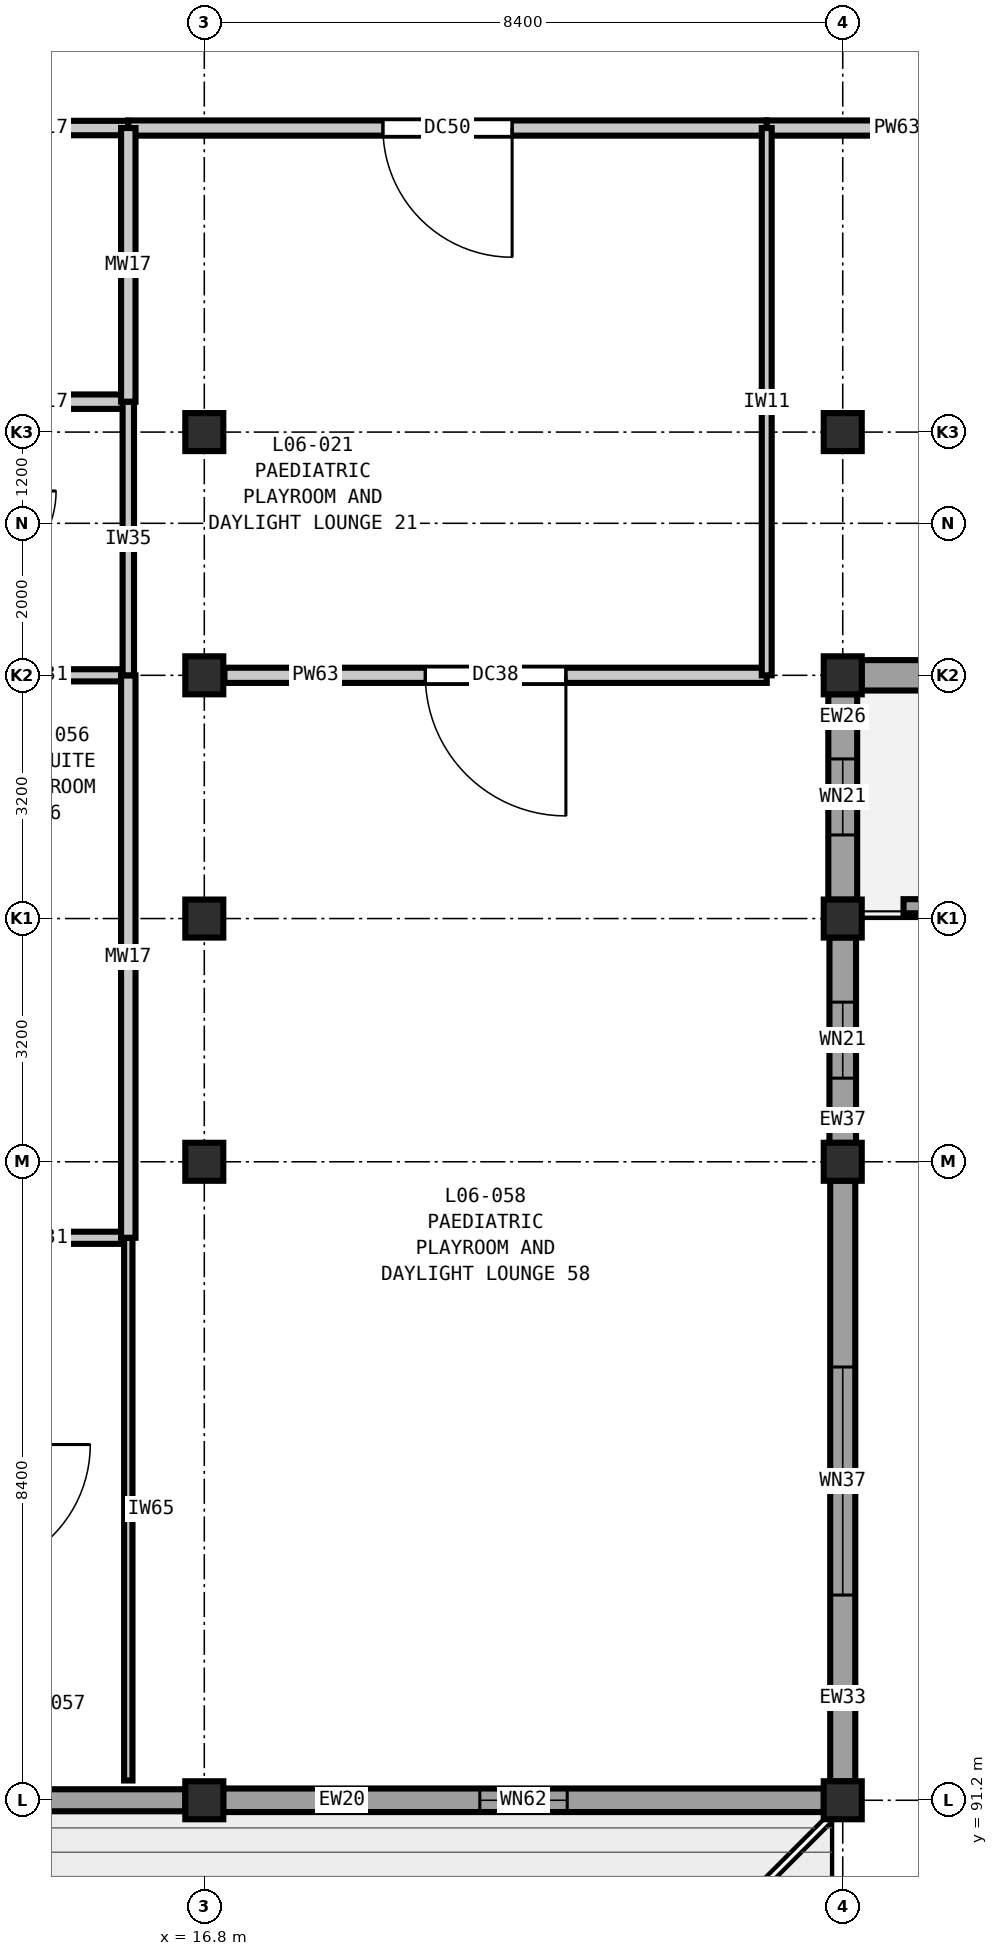
"""IFC4 building model, lengths in metres.
Left out: names, types, materials, properties, quantities, classifications, styles, units other than length and angle.
Written with IfcOpenShell. Run it as: python <this file> out.ifc"""

import sys

from ifc_helpers import new_model, si_unit, direction, frame, frame_2d, origin, origin_2d, place, context, subcontext, project, spatial, rectangle, extrude, element, fill, save


model = new_model("IFC4")
c1 = context("Model", 3, precision=1e-05, world=origin(), true_north=direction((0.0, 1.0)))
c2 = subcontext(c1, "Body", "Model", "MODEL_VIEW")
j1 = project(units=[si_unit("LENGTHUNIT", "METRE"), si_unit("PLANEANGLEUNIT", "RADIAN")], contexts=[c1])
p1 = place(None, origin())
s1 = spatial("IfcSite", under=j1, at=p1, CompositionType="ELEMENT")
p2 = place(p1, origin())
s2 = spatial("IfcBuilding", under=s1, at=p2, CompositionType="ELEMENT")
p3 = place(p2, frame((0.0, 0.0, 28.8)))
s3 = spatial("IfcBuildingStorey", under=s2, at=p3, CompositionType="ELEMENT", Elevation=28.8)
for number, where, z_axis, x_axis in (
    (1, (16.8, 91.2, 0.0), (0.0, 0.0, 1.0), (1.0, 0.0, 0.0)),
    (2, (16.8, 99.6, 0.0), (0.0, 0.0, 1.0), (1.0, 0.0, 0.0)),
    (3, (16.8, 102.8, 0.0), (0.0, 0.0, 1.0), (1.0, 0.0, 0.0)),
    (4, (16.8, 106.0, 0.0), (0.0, 0.0, 1.0), (1.0, 0.0, 0.0)),
    (5, (16.8, 109.2, 0.0), (0.0, 0.0, 1.0), (1.0, 0.0, 0.0)),
    (6, (25.2, 91.2, 0.0), (0.0, 0.0, 1.0), (1.0, 0.0, 0.0)),
    (7, (25.2, 99.6, 0.0), (0.0, 0.0, 1.0), (1.0, 0.0, 0.0)),
    (8, (25.2, 102.8, 0.0), (0.0, 0.0, 1.0), (1.0, 0.0, 0.0)),
    (9, (25.2, 106.0, 0.0), (0.0, 0.0, 1.0), (1.0, 0.0, 0.0)),
    (10, (25.2, 109.2, 0.0), (0.0, 0.0, 1.0), (1.0, 0.0, 0.0)),
):
    element("IfcColumn", number, at=place(p3, frame(where, z_axis=z_axis, x_axis=x_axis)), inside=s3, PredefinedType="COLUMN", context=c2, shape_type="SweptSolid", body=[
        extrude(rectangle(XDim=0.5, YDim=0.5, at=origin_2d()), origin(), (0.0, 0.0, 1.0), 4.2),
    ])
p4 = place(p3, frame((33.352, 106.0, 0.0), z_axis=(0.0, 0.0, 1.0), x_axis=(-1.0, 0.0, 0.0)))
e11 = element("IfcWall", 11, at=p4, inside=s3, PredefinedType="SOLIDWALL", context=c2, shape_type="SweptSolid", body=[
    extrude(rectangle(XDim=7.904, YDim=0.4, at=frame_2d((3.952, 0.0))), origin(), (0.0, 0.0, 1.0), 3.48),
])
p5 = place(p4, frame((2.877, 0.0, 0.9)))
e12 = element("IfcOpeningElement", 12, at=p5, cuts=e11, PredefinedType="OPENING", context=c2, shape_type="SweptSolid", body=[
    extrude(rectangle(XDim=2.15, YDim=2.15, at=frame_2d((1.075, 1.075))), frame((0.0, 0.21, 0.0), z_axis=(0.0, -1.0, 0.0), x_axis=(1.0, 0.0, 0.0)), (0.0, 0.0, 1.0), 0.42),
])
p6 = place(p3, frame((25.2, 105.752, 0.0), z_axis=(0.0, 0.0, 1.0), x_axis=(0.0, -1.0, 0.0)))
e13 = element("IfcWall", 13, at=p6, inside=s3, PredefinedType="SOLIDWALL", context=c2, shape_type="SweptSolid", body=[
    extrude(rectangle(XDim=2.704, YDim=0.38, at=frame_2d((1.352, 0.0))), origin(), (0.0, 0.0, 1.0), 3.48),
])
p7 = place(p6, frame((0.852, 0.0, 0.9)))
e14 = element("IfcOpeningElement", 14, at=p7, cuts=e13, PredefinedType="OPENING", context=c2, shape_type="SweptSolid", body=[
    extrude(rectangle(XDim=1.0, YDim=1.55, at=frame_2d((0.5, 0.775))), frame((0.0, 0.2, 0.0), z_axis=(0.0, -1.0, 0.0), x_axis=(1.0, 0.0, 0.0)), (0.0, 0.0, 1.0), 0.4),
])
p8 = place(p3, frame((25.2, 102.552, 0.0), z_axis=(0.0, 0.0, 1.0), x_axis=(0.0, -1.0, 0.0)))
e15 = element("IfcWall", 15, at=p8, inside=s3, PredefinedType="SOLIDWALL", context=c2, shape_type="SweptSolid", body=[
    extrude(rectangle(XDim=2.704, YDim=0.35, at=frame_2d((1.352, 0.0))), origin(), (0.0, 0.0, 1.0), 3.48),
])
p9 = place(p8, frame((0.852, 0.0, 0.9)))
e16 = element("IfcOpeningElement", 16, at=p9, cuts=e15, PredefinedType="OPENING", context=c2, shape_type="SweptSolid", body=[
    extrude(rectangle(XDim=1.0, YDim=1.55, at=frame_2d((0.5, 0.775))), frame((0.0, 0.185, 0.0), z_axis=(0.0, -1.0, 0.0), x_axis=(1.0, 0.0, 0.0)), (0.0, 0.0, 1.0), 0.37),
])
p10 = place(p3, frame((25.2, 99.352, 0.0), z_axis=(0.0, 0.0, 1.0), x_axis=(0.0, -1.0, 0.0)))
e17 = element("IfcWall", 17, at=p10, inside=s3, PredefinedType="SOLIDWALL", context=c2, shape_type="SweptSolid", body=[
    extrude(rectangle(XDim=7.904, YDim=0.33, at=frame_2d((3.952, 0.0))), origin(), (0.0, 0.0, 1.0), 3.48),
])
p11 = place(p10, frame((2.452, 0.0, 0.9)))
e18 = element("IfcOpeningElement", 18, at=p11, cuts=e17, PredefinedType="OPENING", context=c2, shape_type="SweptSolid", body=[
    extrude(rectangle(XDim=3.0, YDim=2.15, at=frame_2d((1.5, 1.075))), frame((0.0, 0.175, 0.0), z_axis=(0.0, -1.0, 0.0), x_axis=(1.0, 0.0, 0.0)), (0.0, 0.0, 1.0), 0.35),
])
p12 = place(p3, frame((24.952, 91.2, 0.0), z_axis=(0.0, 0.0, 1.0), x_axis=(-1.0, 0.0, 0.0)))
e19 = element("IfcWall", 19, at=p12, inside=s3, PredefinedType="SOLIDWALL", context=c2, shape_type="SweptSolid", body=[
    extrude(rectangle(XDim=7.904, YDim=0.31, at=frame_2d((3.952, 0.0))), origin(), (0.0, 0.0, 1.0), 3.48),
])
p13 = place(p12, frame((3.377, 0.0, 0.9)))
e20 = element("IfcOpeningElement", 20, at=p13, cuts=e19, PredefinedType="OPENING", context=c2, shape_type="SweptSolid", body=[
    extrude(rectangle(XDim=1.15, YDim=1.4, at=frame_2d((0.575, 0.7))), frame((0.0, 0.165, 0.0), z_axis=(0.0, -1.0, 0.0), x_axis=(1.0, 0.0, 0.0)), (0.0, 0.0, 1.0), 0.33),
])
p14 = place(p3, frame((16.552, 91.2, 0.0), z_axis=(0.0, 0.0, 1.0), x_axis=(-1.0, 0.0, 0.0)))
e21 = element("IfcWall", 21, at=p14, inside=s3, PredefinedType="SOLIDWALL", context=c2, shape_type="SweptSolid", body=[
    extrude(rectangle(XDim=7.904, YDim=0.29, at=frame_2d((3.952, 0.0))), origin(), (0.0, 0.0, 1.0), 3.48),
])
p15 = place(p14, frame((4.665, 0.0, 0.9)))
e22 = element("IfcOpeningElement", 22, at=p15, cuts=e21, PredefinedType="OPENING", context=c2, shape_type="SweptSolid", body=[
    extrude(rectangle(XDim=1.15, YDim=1.4, at=frame_2d((0.575, 0.7))), frame((0.0, 0.155, 0.0), z_axis=(0.0, -1.0, 0.0), x_axis=(1.0, 0.0, 0.0)), (0.0, 0.0, 1.0), 0.31),
])
p16 = place(p3, frame((26.0, 102.95, 0.0), z_axis=(0.0, 0.0, 1.0), x_axis=(1.0, 0.0, 0.0)))
e23 = element("IfcWall", 23, at=p16, inside=s3, PredefinedType="PARAPET", context=c2, shape_type="SweptSolid", body=[
    extrude(rectangle(XDim=7.0, YDim=0.21, at=frame_2d((3.5, 0.0))), origin(), (0.0, 0.0, 1.0), 0.95),
])
p17 = place(p3, frame((13.6, 98.6, 0.0), z_axis=(0.0, 0.0, 1.0), x_axis=(1.0, 0.0, 0.0)))
e24 = element("IfcWall", 24, at=p17, inside=s3, PredefinedType="PLUMBINGWALL", context=c2, shape_type="SweptSolid", body=[
    extrude(rectangle(XDim=2.2, YDim=0.16, at=frame_2d((1.1, 0.0))), origin(), (0.0, 0.0, 1.0), 3.92),
])
p18 = place(p3, frame((13.6, 106.0, 0.0), z_axis=(0.0, 0.0, 1.0), x_axis=(1.0, 0.0, 0.0)))
e25 = element("IfcWall", 25, at=p18, inside=s3, PredefinedType="PLUMBINGWALL", context=c2, shape_type="SweptSolid", body=[
    extrude(rectangle(XDim=2.2, YDim=0.16, at=frame_2d((1.1, 0.0))), origin(), (0.0, 0.0, 1.0), 3.635),
])
p19 = place(p3, frame((17.065, 106.0, 0.0), z_axis=(0.0, 0.0, 1.0), x_axis=(1.0, 0.0, 0.0)))
e26 = element("IfcWall", 26, at=p19, inside=s3, PredefinedType="PARTITIONING", context=c2, shape_type="SweptSolid", body=[
    extrude(rectangle(XDim=7.135, YDim=0.2, at=frame_2d((3.567, 0.0))), origin(), (0.0, 0.0, 1.0), 3.635),
])
p20 = place(p19, frame((2.643, 0.0, 0.0)))
e27 = element("IfcOpeningElement", 27, at=p20, cuts=e26, PredefinedType="OPENING", context=c2, shape_type="SweptSolid", body=[
    extrude(rectangle(XDim=1.85, YDim=2.3, at=frame_2d((0.925, 1.15))), frame((0.0, 0.11, 0.0), z_axis=(0.0, -1.0, 0.0), x_axis=(1.0, 0.0, 0.0)), (0.0, 0.0, 1.0), 0.22),
])
for number, where, z_axis, x_axis in (
    (28, (13.6, 109.6, 0.0), (0.0, 0.0, 1.0), (1.0, 0.0, 0.0)),
    (29, (13.6, 113.2, 0.0), (0.0, 0.0, 1.0), (1.0, 0.0, 0.0)),
):
    element("IfcWall", number, at=place(p3, frame(where, z_axis=z_axis, x_axis=x_axis)), inside=s3, PredefinedType="PLUMBINGWALL", context=c2, shape_type="SweptSolid", body=[
        extrude(rectangle(XDim=2.2, YDim=0.19, at=frame_2d((1.1, 0.0))), origin(), (0.0, 0.0, 1.0), 3.92),
    ])
p21 = place(p3, frame((15.8, 113.2, 0.0), z_axis=(0.0, 0.0, 1.0), x_axis=(1.0, 0.0, 0.0)))
e30 = element("IfcWall", 30, at=p21, inside=s3, PredefinedType="PARTITIONING", context=c2, shape_type="SweptSolid", body=[
    extrude(rectangle(XDim=8.4, YDim=0.2, at=frame_2d((4.2, 0.0))), origin(), (0.0, 0.0, 1.0), 3.92),
])
p22 = place(p21, frame((3.35, 0.0, 0.0)))
e31 = element("IfcOpeningElement", 31, at=p22, cuts=e30, PredefinedType="OPENING", context=c2, shape_type="SweptSolid", body=[
    extrude(rectangle(XDim=1.7, YDim=2.3, at=frame_2d((0.85, 1.15))), frame((0.0, 0.11, 0.0), z_axis=(0.0, -1.0, 0.0), x_axis=(1.0, 0.0, 0.0)), (0.0, 0.0, 1.0), 0.22),
])
p23 = place(p3, frame((24.2, 113.2, 0.0), z_axis=(0.0, 0.0, 1.0), x_axis=(1.0, 0.0, 0.0)))
e32 = element("IfcWall", 32, at=p23, inside=s3, PredefinedType="PARTITIONING", context=c2, shape_type="SweptSolid", body=[
    extrude(rectangle(XDim=9.2, YDim=0.2, at=frame_2d((4.6, 0.0))), origin(), (0.0, 0.0, 1.0), 3.92),
])
p24 = place(p23, frame((3.675, 0.0, 0.0)))
e33 = element("IfcOpeningElement", 33, at=p24, cuts=e32, PredefinedType="OPENING", context=c2, shape_type="SweptSolid", body=[
    extrude(rectangle(XDim=1.85, YDim=2.3, at=frame_2d((0.925, 1.15))), frame((0.0, 0.11, 0.0), z_axis=(0.0, -1.0, 0.0), x_axis=(1.0, 0.0, 0.0)), (0.0, 0.0, 1.0), 0.22),
])
p25 = place(p3, frame((15.8, 91.46, 0.0), z_axis=(0.0, 0.0, 1.0), x_axis=(0.0, 1.0, 0.0)))
e34 = element("IfcWall", 34, at=p25, inside=s3, PredefinedType="PARTITIONING", context=c2, shape_type="SweptSolid", body=[
    extrude(rectangle(XDim=7.14, YDim=0.11, at=frame_2d((3.57, 0.0))), origin(), (0.0, 0.0, 1.0), 3.92),
])
p26 = place(p3, frame((15.8, 98.6, 0.0), z_axis=(0.0, 0.0, 1.0), x_axis=(0.0, 1.0, 0.0)))
e35 = element("IfcWall", 35, at=p26, inside=s3, PredefinedType="PLUMBINGWALL", context=c2, shape_type="SweptSolid", body=[
    extrude(rectangle(XDim=7.4, YDim=0.19, at=frame_2d((3.7, 0.0))), origin(), (0.0, 0.0, 1.0), 3.92),
])
p27 = place(p3, frame((15.8, 106.0, 0.0), z_axis=(0.0, 0.0, 1.0), x_axis=(0.0, 1.0, 0.0)))
e36 = element("IfcWall", 36, at=p27, inside=s3, PredefinedType="PARTITIONING", context=c2, shape_type="SweptSolid", body=[
    extrude(rectangle(XDim=3.6, YDim=0.15, at=frame_2d((1.8, 0.0))), origin(), (0.0, 0.0, 1.0), 3.92),
])
p28 = place(p3, frame((15.8, 109.6, 0.0), z_axis=(0.0, 0.0, 1.0), x_axis=(0.0, 1.0, 0.0)))
e37 = element("IfcWall", 37, at=p28, inside=s3, PredefinedType="PLUMBINGWALL", context=c2, shape_type="SweptSolid", body=[
    extrude(rectangle(XDim=3.6, YDim=0.19, at=frame_2d((1.8, 0.0))), origin(), (0.0, 0.0, 1.0), 3.92),
])
p29 = place(p3, frame((24.2, 106.0, 0.0), z_axis=(0.0, 0.0, 1.0), x_axis=(0.0, 1.0, 0.0)))
e38 = element("IfcWall", 38, at=p29, inside=s3, PredefinedType="PARTITIONING", context=c2, shape_type="SweptSolid", body=[
    extrude(rectangle(XDim=7.2, YDim=0.13, at=frame_2d((3.6, 0.0))), origin(), (0.0, 0.0, 1.0), 3.92),
])
p30 = place(p7, origin())
e39 = element("IfcWindow", 39, at=p30, inside=s3, PartitioningType="SINGLE_PANEL", PredefinedType="WINDOW", context=c2, shape_type="SweptSolid", body=[
    extrude(rectangle(XDim=1.0, YDim=1.55, at=frame_2d((0.5, 0.775))), frame((0.0, 0.03, 0.0), z_axis=(0.0, -1.0, 0.0), x_axis=(1.0, 0.0, 0.0)), (0.0, 0.0, 1.0), 0.06),
])
fill(e14, e39)
p31 = place(p9, origin())
e40 = element("IfcWindow", 40, at=p31, inside=s3, PartitioningType="SINGLE_PANEL", PredefinedType="WINDOW", context=c2, shape_type="SweptSolid", body=[
    extrude(rectangle(XDim=1.0, YDim=1.55, at=frame_2d((0.5, 0.775))), frame((0.0, 0.03, 0.0), z_axis=(0.0, -1.0, 0.0), x_axis=(1.0, 0.0, 0.0)), (0.0, 0.0, 1.0), 0.06),
])
fill(e16, e40)
p32 = place(p11, origin())
e41 = element("IfcWindow", 41, at=p32, inside=s3, PartitioningType="DOUBLE_PANEL_VERTICAL", PredefinedType="WINDOW", context=c2, shape_type="SweptSolid", body=[
    extrude(rectangle(XDim=3.0, YDim=2.15, at=frame_2d((1.5, 1.075))), frame((0.0, 0.03, 0.0), z_axis=(0.0, -1.0, 0.0), x_axis=(1.0, 0.0, 0.0)), (0.0, 0.0, 1.0), 0.06),
])
fill(e18, e41)
p33 = place(p13, origin())
e42 = element("IfcWindow", 42, at=p33, inside=s3, PartitioningType="SINGLE_PANEL", PredefinedType="WINDOW", context=c2, shape_type="SweptSolid", body=[
    extrude(rectangle(XDim=1.15, YDim=1.4, at=frame_2d((0.575, 0.7))), frame((0.0, 0.03, 0.0), z_axis=(0.0, -1.0, 0.0), x_axis=(1.0, 0.0, 0.0)), (0.0, 0.0, 1.0), 0.06),
])
fill(e20, e42)
p34 = place(p20, frame((1.85, 0.0, 0.0), z_axis=(0.0, 0.0, 1.0), x_axis=(-1.0, 0.0, 0.0)))
e43 = element("IfcDoor", 43, at=p34, inside=s3, OperationType="SINGLE_SWING_LEFT", PredefinedType="DOOR", context=c2, shape_type="SweptSolid", body=[
    extrude(rectangle(XDim=1.85, YDim=2.3, at=frame_2d((0.925, 1.15))), frame((0.0, 0.025, 0.0), z_axis=(0.0, -1.0, 0.0), x_axis=(1.0, 0.0, 0.0)), (0.0, 0.0, 1.0), 0.05),
])
fill(e27, e43)
p35 = place(p22, frame((1.7, 0.0, 0.0), z_axis=(0.0, 0.0, 1.0), x_axis=(-1.0, 0.0, 0.0)))
e44 = element("IfcDoor", 44, at=p35, inside=s3, OperationType="SINGLE_SWING_LEFT", PredefinedType="DOOR", context=c2, shape_type="SweptSolid", body=[
    extrude(rectangle(XDim=1.7, YDim=2.3, at=frame_2d((0.85, 1.15))), frame((0.0, 0.025, 0.0), z_axis=(0.0, -1.0, 0.0), x_axis=(1.0, 0.0, 0.0)), (0.0, 0.0, 1.0), 0.05),
])
fill(e31, e44)
save(model, sys.argv[1])
